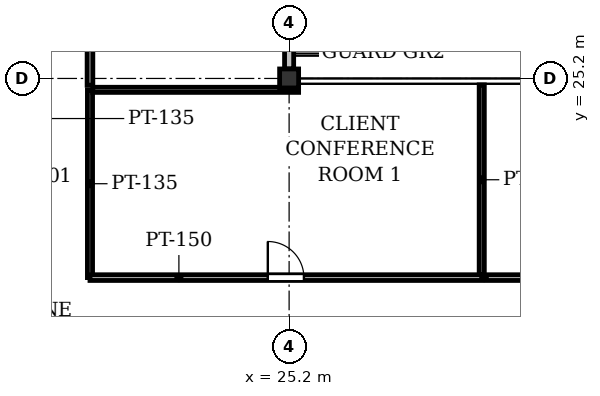
"""IFC4 building model, lengths in metres.
Left out: names, types, materials, properties, quantities, classifications, styles, units other than length and angle.
Written with IfcOpenShell. Run it as: python <this file> out.ifc"""

import sys

from ifc_helpers import new_model, si_unit, direction, frame, frame_2d, origin, origin_2d, place, context, subcontext, project, spatial, rectangle, i_section, extrude, element, fill, save


model = new_model("IFC4")
c1 = context("Model", 3, precision=1e-05, world=origin(), true_north=direction((0.0, 1.0)))
c2 = subcontext(c1, "Body", "Model", "MODEL_VIEW")
j1 = project(units=[si_unit("LENGTHUNIT", "METRE"), si_unit("PLANEANGLEUNIT", "RADIAN")], contexts=[c1])
p1 = place(None, origin())
s1 = spatial("IfcSite", under=j1, at=p1, CompositionType="ELEMENT")
p2 = place(p1, origin())
s2 = spatial("IfcBuilding", under=s1, at=p2, CompositionType="ELEMENT")
p3 = place(p2, frame((0.0, 0.0, 37.4)))
s3 = spatial("IfcBuildingStorey", under=s2, at=p3, CompositionType="ELEMENT", Elevation=37.4)
p4 = place(p3, frame((25.2, 25.2, 0.0), z_axis=(0.0, 0.0, 1.0), x_axis=(1.0, 0.0, 0.0)))
e1 = element("IfcColumn", 1, at=p4, inside=s3, PredefinedType="COLUMN", context=c2, shape_type="SweptSolid", body=[
    extrude(i_section(OverallWidth=0.5, OverallDepth=0.5, WebThickness=0.028, FlangeThickness=0.04, at=origin_2d()), origin(), (0.0, 0.0, 1.0), 4.2),
])
p5 = place(p3, frame((25.2, 33.35, 0.0), z_axis=(0.0, 0.0, 1.0), x_axis=(0.0, -1.0, 0.0)))
e2 = element("IfcWall", 2, at=p5, inside=s3, PredefinedType="STANDARD", context=c2, shape_type="SweptSolid", body=[
    extrude(rectangle(XDim=7.9, YDim=0.24, at=frame_2d((3.95, 0.0))), origin(), (0.0, 0.0, 1.0), 3.471),
])
p6 = place(p5, frame((0.3, 0.0, 0.0)))
e3 = element("IfcOpeningElement", 3, at=p6, cuts=e2, PredefinedType="OPENING", context=c2, shape_type="SweptSolid", body=[
    extrude(rectangle(XDim=1.2, YDim=2.2, at=frame_2d((0.6, 1.1))), frame((0.0, 0.13, 0.0), z_axis=(0.0, -1.0, 0.0), x_axis=(1.0, 0.0, 0.0)), (0.0, 0.0, 1.0), 0.26),
])
p7 = place(p5, frame((3.2, 0.0, 0.9)))
e4 = element("IfcOpeningElement", 4, at=p7, cuts=e2, PredefinedType="OPENING", context=c2, shape_type="SweptSolid", body=[
    extrude(rectangle(XDim=1.5, YDim=1.6, at=frame_2d((0.75, 0.8))), frame((0.0, 0.13, 0.0), z_axis=(0.0, -1.0, 0.0), x_axis=(1.0, 0.0, 0.0)), (0.0, 0.0, 1.0), 0.26),
])
p8 = place(p3, frame((19.96, 24.901, 0.0), z_axis=(0.0, 0.0, 1.0), x_axis=(0.0, -1.0, 0.0)))
e5 = element("IfcWall", 5, at=p8, inside=s3, PredefinedType="PARTITIONING", context=c2, shape_type="SweptSolid", body=[
    extrude(rectangle(XDim=4.941, YDim=0.135, at=frame_2d((2.47, 0.0))), origin(), (0.0, 0.0, 1.0), 3.925),
])
p9 = place(p3, frame((19.96, 19.96, 0.0), z_axis=(0.0, 0.0, 1.0), x_axis=(1.0, 0.0, 0.0)))
e6 = element("IfcWall", 6, at=p9, inside=s3, PredefinedType="PARTITIONING", context=c2, shape_type="SweptSolid", body=[
    extrude(rectangle(XDim=10.309, YDim=0.15, at=frame_2d((5.154, 0.0))), origin(), (0.0, 0.0, 1.0), 3.323),
])
p10 = place(p9, frame((4.679, 0.0, 0.0)))
e7 = element("IfcOpeningElement", 7, at=p10, cuts=e6, PredefinedType="OPENING", context=c2, shape_type="SweptSolid", body=[
    extrude(rectangle(XDim=0.95, YDim=2.15, at=frame_2d((0.475, 1.075))), frame((0.0, 0.085, 0.0), z_axis=(0.0, -1.0, 0.0), x_axis=(1.0, 0.0, 0.0)), (0.0, 0.0, 1.0), 0.17),
])
p11 = place(p3, frame((30.269, 20.039, 0.0), z_axis=(0.0, 0.0, 1.0), x_axis=(0.0, 1.0, 0.0)))
e8 = element("IfcWall", 8, at=p11, inside=s3, PredefinedType="PARTITIONING", context=c2, shape_type="SweptSolid", body=[
    extrude(rectangle(XDim=4.992, YDim=0.135, at=frame_2d((2.496, 0.0))), origin(), (0.0, 0.0, 1.0), 3.925),
])
p12 = place(p3, frame((25.45, 24.901, 0.0), z_axis=(0.0, 0.0, 1.0), x_axis=(-1.0, 0.0, 0.0)))
e9 = element("IfcWall", 9, at=p12, inside=s3, PredefinedType="PARTITIONING", context=c2, shape_type="SweptSolid", body=[
    extrude(rectangle(XDim=5.418, YDim=0.135, at=frame_2d((2.709, 0.0))), origin(), (0.0, 0.0, 1.0), 3.323),
])
p13 = place(p3, frame((19.96, 43.006, 0.0), z_axis=(0.0, 0.0, 1.0), x_axis=(1.3574599e-05, -0.999999999908, 0.0)))
e10 = element("IfcWall", 10, at=p13, inside=s3, PredefinedType="PARTITIONING", context=c2, shape_type="SweptSolid", body=[
    extrude(rectangle(XDim=17.985, YDim=0.15, at=frame_2d((8.993, 0.0))), origin(), (0.0, 0.0, 1.0), 3.313),
])
p14 = place(p13, frame((8.518, 0.0, 0.0)))
e11 = element("IfcOpeningElement", 11, at=p14, cuts=e10, PredefinedType="OPENING", context=c2, shape_type="SweptSolid", body=[
    extrude(rectangle(XDim=0.95, YDim=2.15, at=frame_2d((0.475, 1.075))), frame((0.0, 0.085, 0.0), z_axis=(0.0, -1.0, 0.0), x_axis=(1.0, 0.0, 0.0)), (0.0, 0.0, 1.0), 0.17),
])
p15 = place(p3, frame((30.389, 19.96, 0.0), z_axis=(0.0, 0.0, 1.0), x_axis=(1.0, 0.0, 0.0)))
e12 = element("IfcWall", 12, at=p15, inside=s3, PredefinedType="PARTITIONING", context=c2, shape_type="SweptSolid", body=[
    extrude(rectangle(XDim=12.811, YDim=0.15, at=frame_2d((6.406, 0.0))), origin(), (0.0, 0.0, 1.0), 3.323),
])
p16 = place(p15, frame((5.931, 0.0, 0.0)))
e13 = element("IfcOpeningElement", 13, at=p16, cuts=e12, PredefinedType="OPENING", context=c2, shape_type="SweptSolid", body=[
    extrude(rectangle(XDim=0.95, YDim=2.15, at=frame_2d((0.475, 1.075))), frame((0.0, 0.085, 0.0), z_axis=(0.0, -1.0, 0.0), x_axis=(1.0, 0.0, 0.0)), (0.0, 0.0, 1.0), 0.17),
])
p17 = place(p10, origin())
e14 = element("IfcDoor", 14, at=p17, inside=s3, OperationType="SINGLE_SWING_LEFT", PredefinedType="DOOR", context=c2, shape_type="SweptSolid", body=[
    extrude(rectangle(XDim=0.95, YDim=2.15, at=frame_2d((0.475, 1.075))), frame((0.0, 0.025, 0.0), z_axis=(0.0, -1.0, 0.0), x_axis=(1.0, 0.0, 0.0)), (0.0, 0.0, 1.0), 0.05),
])
fill(e7, e14)
save(model, sys.argv[1])
